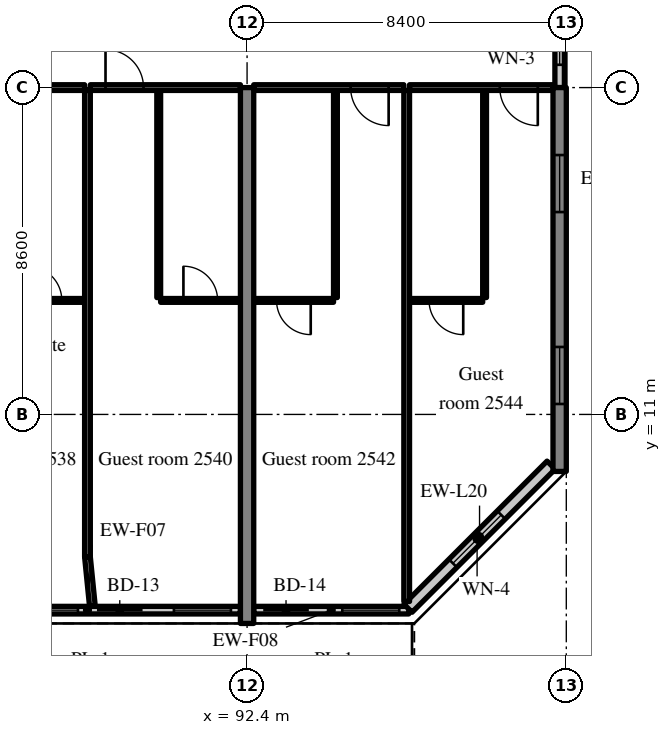
"""IFC4 building model, lengths in metres.
Left out: names, types, materials, properties, quantities, classifications, styles, units other than length and angle.
Written with IfcOpenShell. Run it as: python <this file> out.ifc"""

import sys

from ifc_helpers import new_model, si_unit, direction, frame, frame_2d, origin, place, context, subcontext, project, spatial, rectangle, extrude, source, transform, mapped, element, fill, save


model = new_model("IFC4")
c1 = context("Model", 3, precision=1e-05, world=origin(), true_north=direction((0.0, 1.0)))
c2 = subcontext(c1, "Body", "Model", "MODEL_VIEW")
j1 = project(units=[si_unit("LENGTHUNIT", "METRE"), si_unit("PLANEANGLEUNIT", "RADIAN")], contexts=[c1])
p1 = place(None, origin())
s1 = spatial("IfcSite", under=j1, at=p1, CompositionType="ELEMENT")
p2 = place(p1, origin())
s2 = spatial("IfcBuilding", under=s1, at=p2, CompositionType="ELEMENT")
p3 = place(p2, frame((0.0, 0.0, 106.6)))
s3 = spatial("IfcBuildingStorey", under=s2, at=p3, CompositionType="ELEMENT", Elevation=106.6)
m1 = source(origin(), c2, "Body", "SweptSolid", [
    extrude(rectangle(XDim=14.1, YDim=0.35, at=frame_2d((7.05, 0.0))), origin(), (0.0, 0.0, 1.0), 3.52),
])
p4 = place(p3, frame((92.4, 5.5, 0.0), z_axis=(0.0, 0.0, 1.0), x_axis=(0.0, 1.0, 0.0)))
e1 = element("IfcWall", 1, at=p4, inside=s3, PredefinedType="SHEAR", context=c2, shape_type="MappedRepresentation", body=[
    mapped(m1, transform((0.0, 0.0, 0.0), scale=1.0)),
])
m2 = source(origin(), c2, "Body", "SweptSolid", [
    extrude(rectangle(XDim=10.1, YDim=0.35, at=frame_2d((5.05, 0.0))), origin(), (0.0, 0.0, 1.0), 3.52),
])
p5 = place(p3, frame((100.625, 9.5, 0.0), z_axis=(0.0, 0.0, 1.0), x_axis=(0.0, 1.0, 0.0)))
e2 = element("IfcWall", 2, at=p5, inside=s3, PredefinedType="SHEAR", context=c2, shape_type="MappedRepresentation", body=[
    mapped(m2, transform((0.0, 0.0, 0.0), scale=1.0)),
])
m3 = source(origin(), c2, "Body", "SweptSolid", [
    extrude(rectangle(XDim=1.5, YDim=1.5, at=frame_2d((0.75, 0.75))), frame((0.0, 0.185, 0.0), z_axis=(0.0, -1.0, 0.0), x_axis=(1.0, 0.0, 0.0)), (0.0, 0.0, 1.0), 0.37),
])
p6 = place(p5, frame((1.775, 0.0, 0.9)))
e3 = element("IfcOpeningElement", 3, at=p6, cuts=e2, PredefinedType="OPENING", context=c2, shape_type="MappedRepresentation", body=[
    mapped(m3, transform((0.0, 0.0, 0.0), scale=1.0)),
])
p7 = place(p5, frame((6.825, 0.0, 0.9)))
e4 = element("IfcOpeningElement", 4, at=p7, cuts=e2, PredefinedType="OPENING", context=c2, shape_type="MappedRepresentation", body=[
    mapped(m3, transform((0.0, 0.0, 0.0), scale=1.0)),
])
m4 = source(origin(), c2, "Body", "SweptSolid", [
    extrude(rectangle(XDim=8.05, YDim=0.2, at=frame_2d((4.025, 0.0))), origin(), (0.0, 0.0, 1.0), 2.82),
])
p8 = place(p3, frame((84.175, 5.85, 0.0), z_axis=(0.0, 0.0, 1.0), x_axis=(1.0, 0.0, 0.0)))
e5 = element("IfcWall", 5, at=p8, inside=s3, PredefinedType="SOLIDWALL", context=c2, shape_type="MappedRepresentation", body=[
    mapped(m4, transform((0.0, 0.0, 0.0), scale=1.0)),
])
m5 = source(origin(), c2, "Body", "SweptSolid", [
    extrude(rectangle(XDim=1.2, YDim=2.4, at=frame_2d((0.6, 1.2))), frame((0.0, 0.11, 0.0), z_axis=(0.0, -1.0, 0.0), x_axis=(1.0, 0.0, 0.0)), (0.0, 0.0, 1.0), 0.22),
])
p9 = place(p8, frame((0.25, 0.0, 0.0)))
e6 = element("IfcOpeningElement", 6, at=p9, cuts=e5, PredefinedType="OPENING", context=c2, shape_type="MappedRepresentation", body=[
    mapped(m5, transform((0.0, 0.0, 0.0), scale=1.0)),
])
m6 = source(origin(), c2, "Body", "SweptSolid", [
    extrude(rectangle(XDim=1.5, YDim=1.5, at=frame_2d((0.75, 0.75))), frame((0.0, 0.11, 0.0), z_axis=(0.0, -1.0, 0.0), x_axis=(1.0, 0.0, 0.0)), (0.0, 0.0, 1.0), 0.22),
])
p10 = place(p8, frame((2.275, 0.0, 0.9)))
e7 = element("IfcOpeningElement", 7, at=p10, cuts=e5, PredefinedType="OPENING", context=c2, shape_type="MappedRepresentation", body=[
    mapped(m6, transform((0.0, 0.0, 0.0), scale=1.0)),
])
p11 = place(p8, frame((4.275, 0.0, 0.0)))
e8 = element("IfcOpeningElement", 8, at=p11, cuts=e5, PredefinedType="OPENING", context=c2, shape_type="MappedRepresentation", body=[
    mapped(m5, transform((0.0, 0.0, 0.0), scale=1.0)),
])
p12 = place(p8, frame((6.3, 0.0, 0.9)))
e9 = element("IfcOpeningElement", 9, at=p12, cuts=e5, PredefinedType="OPENING", context=c2, shape_type="MappedRepresentation", body=[
    mapped(m6, transform((0.0, 0.0, 0.0), scale=1.0)),
])
m7 = source(origin(), c2, "Body", "SweptSolid", [
    extrude(rectangle(XDim=4.08, YDim=0.2, at=frame_2d((2.04, 0.0))), origin(), (0.0, 0.0, 1.0), 2.82),
])
p13 = place(p3, frame((92.575, 5.85, 0.0), z_axis=(0.0, 0.0, 1.0), x_axis=(1.0, 0.0, 0.0)))
e10 = element("IfcWall", 10, at=p13, inside=s3, PredefinedType="SOLIDWALL", context=c2, shape_type="MappedRepresentation", body=[
    mapped(m7, transform((0.0, 0.0, 0.0), scale=1.0)),
])
p14 = place(p13, frame((0.25, 0.0, 0.0)))
e11 = element("IfcOpeningElement", 11, at=p14, cuts=e10, PredefinedType="OPENING", context=c2, shape_type="MappedRepresentation", body=[
    mapped(m5, transform((0.0, 0.0, 0.0), scale=1.0)),
])
p15 = place(p13, frame((2.33, 0.0, 0.9)))
e12 = element("IfcOpeningElement", 12, at=p15, cuts=e10, PredefinedType="OPENING", context=c2, shape_type="MappedRepresentation", body=[
    mapped(m6, transform((0.0, 0.0, 0.0), scale=1.0)),
])
m8 = source(origin(), c2, "Body", "SweptSolid", [
    extrude(rectangle(XDim=5.326, YDim=0.3, at=frame_2d((2.663, 0.0))), origin(), (0.0, 0.0, 1.0), 3.52),
])
p16 = place(p3, frame((96.634, 5.9, 0.0), z_axis=(0.0, 0.0, 1.0), x_axis=(0.707083859269, 0.707129702361, 0.0)))
e13 = element("IfcWall", 13, at=p16, inside=s3, PredefinedType="SOLIDWALL", context=c2, shape_type="MappedRepresentation", body=[
    mapped(m8, transform((0.0, 0.0, 0.0), scale=1.0)),
])
m9 = source(origin(), c2, "Body", "SweptSolid", [
    extrude(rectangle(XDim=1.8, YDim=1.5, at=frame_2d((0.9, 0.75))), frame((0.0, 0.16, 0.0), z_axis=(0.0, -1.0, 0.0), x_axis=(1.0, 0.0, 0.0)), (0.0, 0.0, 1.0), 0.32),
])
p17 = place(p16, frame((1.672, 0.0, 0.9)))
e14 = element("IfcOpeningElement", 14, at=p17, cuts=e13, PredefinedType="OPENING", context=c2, shape_type="MappedRepresentation", body=[
    mapped(m9, transform((0.0, 0.0, 0.0), scale=1.0)),
])
m10 = source(origin(), c2, "Body", "SweptSolid", [
    extrude(rectangle(XDim=2.4, YDim=0.25, at=frame_2d((1.2, 0.0))), origin(), (0.0, 0.0, 1.0), 2.62),
])
p18 = place(p3, frame((100.625, 19.6, 0.0), z_axis=(0.0, 0.0, 1.0), x_axis=(0.0, 1.0, 0.0)))
e15 = element("IfcWall", 15, at=p18, inside=s3, PredefinedType="SOLIDWALL", context=c2, shape_type="MappedRepresentation", body=[
    mapped(m10, transform((0.0, 0.0, 0.0), scale=1.0)),
])
m11 = source(origin(), c2, "Body", "SweptSolid", [
    extrude(rectangle(XDim=1.2, YDim=1.5, at=frame_2d((0.6, 0.75))), frame((0.0, 0.135, 0.0), z_axis=(0.0, -1.0, 0.0), x_axis=(1.0, 0.0, 0.0)), (0.0, 0.0, 1.0), 0.27),
])
p19 = place(p18, frame((0.6, 0.0, 0.9)))
e16 = element("IfcOpeningElement", 16, at=p19, cuts=e15, PredefinedType="OPENING", context=c2, shape_type="MappedRepresentation", body=[
    mapped(m11, transform((0.0, 0.0, 0.0), scale=1.0)),
])
m12 = source(origin(), c2, "Body", "SweptSolid", [
    extrude(rectangle(XDim=2.1, YDim=0.1, at=frame_2d((1.05, 0.0))), origin(), (0.0, 0.0, 1.0), 3.52),
])
p20 = place(p3, frame((86.025, 14.0, 0.0), z_axis=(0.0, 0.0, 1.0), x_axis=(1.0, 0.0, 0.0)))
e17 = element("IfcWall", 17, at=p20, inside=s3, PredefinedType="PARTITIONING", context=c2, shape_type="MappedRepresentation", body=[
    mapped(m12, transform((0.0, 0.0, 0.0), scale=1.0)),
])
m13 = source(origin(), c2, "Body", "SweptSolid", [
    extrude(rectangle(XDim=0.9, YDim=2.1, at=frame_2d((0.45, 1.05))), frame((0.0, 0.06, 0.0), z_axis=(0.0, -1.0, 0.0), x_axis=(1.0, 0.0, 0.0)), (0.0, 0.0, 1.0), 0.12),
])
p21 = place(p20, frame((0.6, 0.0, 0.0)))
e18 = element("IfcOpeningElement", 18, at=p21, cuts=e17, PredefinedType="OPENING", context=c2, shape_type="MappedRepresentation", body=[
    mapped(m13, transform((0.0, 0.0, 0.0), scale=1.0)),
])
m14 = source(origin(), c2, "Body", "SweptSolid", [
    extrude(rectangle(XDim=3.95, YDim=0.15, at=frame_2d((1.975, 0.0))), origin(), (0.0, 0.0, 1.0), 2.82),
])
p22 = place(p3, frame((84.175, 19.6, 0.0), z_axis=(0.0, 0.0, 1.0), x_axis=(1.0, 0.0, 0.0)))
e19 = element("IfcWall", 19, at=p22, inside=s3, PredefinedType="PARTITIONING", context=c2, shape_type="MappedRepresentation", body=[
    mapped(m14, transform((0.0, 0.0, 0.0), scale=1.0)),
])
m15 = source(origin(), c2, "Body", "SweptSolid", [
    extrude(rectangle(XDim=1.0, YDim=2.1, at=frame_2d((0.5, 1.05))), frame((0.0, 0.085, 0.0), z_axis=(0.0, -1.0, 0.0), x_axis=(1.0, 0.0, 0.0)), (0.0, 0.0, 1.0), 0.17),
])
p23 = place(p22, frame((0.4, 0.0, 0.0)))
e20 = element("IfcOpeningElement", 20, at=p23, cuts=e19, PredefinedType="OPENING", context=c2, shape_type="MappedRepresentation", body=[
    mapped(m15, transform((0.0, 0.0, 0.0), scale=1.0)),
])
m16 = source(origin(), c2, "Body", "SweptSolid", [
    extrude(rectangle(XDim=5.45, YDim=0.1, at=frame_2d((2.725, 0.0))), origin(), (0.0, 0.0, 1.0), 3.52),
])
p24 = place(p3, frame((90.075, 14.075, 0.0), z_axis=(0.0, 0.0, 1.0), x_axis=(0.0, 1.0, 0.0)))
e21 = element("IfcWall", 21, at=p24, inside=s3, PredefinedType="PARTITIONING", context=c2, shape_type="MappedRepresentation", body=[
    mapped(m16, transform((0.0, 0.0, 0.0), scale=1.0)),
])
p25 = place(p3, frame((90.125, 14.0, 0.0), z_axis=(0.0, 0.0, 1.0), x_axis=(1.0, 0.0, 0.0)))
e22 = element("IfcWall", 22, at=p25, inside=s3, PredefinedType="PARTITIONING", context=c2, shape_type="MappedRepresentation", body=[
    mapped(m12, transform((0.0, 0.0, 0.0), scale=1.0)),
])
p26 = place(p25, frame((0.6, 0.0, 0.0)))
e23 = element("IfcOpeningElement", 23, at=p26, cuts=e22, PredefinedType="OPENING", context=c2, shape_type="MappedRepresentation", body=[
    mapped(m13, transform((0.0, 0.0, 0.0), scale=1.0)),
])
m17 = source(origin(), c2, "Body", "SweptSolid", [
    extrude(rectangle(XDim=3.95, YDim=0.15, at=frame_2d((1.975, 0.0))), origin(), (0.0, 0.0, 1.0), 2.82),
])
p27 = place(p3, frame((88.275, 19.6, 0.0), z_axis=(0.0, 0.0, 1.0), x_axis=(1.0, 0.0, 0.0)))
e24 = element("IfcWall", 24, at=p27, inside=s3, PredefinedType="PARTITIONING", context=c2, shape_type="MappedRepresentation", body=[
    mapped(m17, transform((0.0, 0.0, 0.0), scale=1.0)),
])
p28 = place(p27, frame((0.4, 0.0, 0.0)))
e25 = element("IfcOpeningElement", 25, at=p28, cuts=e24, PredefinedType="OPENING", context=c2, shape_type="MappedRepresentation", body=[
    mapped(m15, transform((0.0, 0.0, 0.0), scale=1.0)),
])
m18 = source(origin(), c2, "Body", "SweptSolid", [
    extrude(rectangle(XDim=12.275, YDim=0.15, at=frame_2d((6.137, 0.0))), origin(), (0.0, 0.0, 1.0), 3.52),
])
p29 = place(p3, frame((88.2, 7.25, 0.0), z_axis=(0.0, 0.0, 1.0), x_axis=(0.0, 1.0, 0.0)))
e26 = element("IfcWall", 26, at=p29, inside=s3, PredefinedType="PARTITIONING", context=c2, shape_type="MappedRepresentation", body=[
    mapped(m18, transform((0.0, 0.0, 0.0), scale=1.0)),
])
p30 = place(p3, frame((94.725, 14.075, 0.0), z_axis=(0.0, 0.0, 1.0), x_axis=(0.0, 1.0, 0.0)))
e27 = element("IfcWall", 27, at=p30, inside=s3, PredefinedType="PARTITIONING", context=c2, shape_type="MappedRepresentation", body=[
    mapped(m16, transform((0.0, 0.0, 0.0), scale=1.0)),
])
p31 = place(p3, frame((92.575, 14.0, 0.0), z_axis=(0.0, 0.0, 1.0), x_axis=(1.0, 0.0, 0.0)))
e28 = element("IfcWall", 28, at=p31, inside=s3, PredefinedType="PARTITIONING", context=c2, shape_type="MappedRepresentation", body=[
    mapped(m12, transform((0.0, 0.0, 0.0), scale=1.0)),
])
p32 = place(p31, frame((0.6, 0.0, 0.0)))
e29 = element("IfcOpeningElement", 29, at=p32, cuts=e28, PredefinedType="OPENING", context=c2, shape_type="MappedRepresentation", body=[
    mapped(m13, transform((0.0, 0.0, 0.0), scale=1.0)),
])
p33 = place(p3, frame((92.575, 19.6, 0.0), z_axis=(0.0, 0.0, 1.0), x_axis=(1.0, 0.0, 0.0)))
e30 = element("IfcWall", 30, at=p33, inside=s3, PredefinedType="PARTITIONING", context=c2, shape_type="MappedRepresentation", body=[
    mapped(m14, transform((0.0, 0.0, 0.0), scale=1.0)),
])
p34 = place(p33, frame((2.55, 0.0, 0.0)))
e31 = element("IfcOpeningElement", 31, at=p34, cuts=e30, PredefinedType="OPENING", context=c2, shape_type="MappedRepresentation", body=[
    mapped(m15, transform((0.0, 0.0, 0.0), scale=1.0)),
])
p35 = place(p3, frame((98.65, 14.075, 0.0), z_axis=(0.0, 0.0, 1.0), x_axis=(0.0, 1.0, 0.0)))
e32 = element("IfcWall", 32, at=p35, inside=s3, PredefinedType="PARTITIONING", context=c2, shape_type="MappedRepresentation", body=[
    mapped(m16, transform((0.0, 0.0, 0.0), scale=1.0)),
])
m19 = source(origin(), c2, "Body", "SweptSolid", [
    extrude(rectangle(XDim=1.925, YDim=0.1, at=frame_2d((0.962, 0.0))), origin(), (0.0, 0.0, 1.0), 3.52),
])
p36 = place(p3, frame((96.675, 14.0, 0.0), z_axis=(0.0, 0.0, 1.0), x_axis=(1.0, 0.0, 0.0)))
e33 = element("IfcWall", 33, at=p36, inside=s3, PredefinedType="PARTITIONING", context=c2, shape_type="MappedRepresentation", body=[
    mapped(m19, transform((0.0, 0.0, 0.0), scale=1.0)),
])
p37 = place(p36, frame((0.513, 0.0, 0.0)))
e34 = element("IfcOpeningElement", 34, at=p37, cuts=e33, PredefinedType="OPENING", context=c2, shape_type="MappedRepresentation", body=[
    mapped(m13, transform((0.0, 0.0, 0.0), scale=1.0)),
])
m20 = source(origin(), c2, "Body", "SweptSolid", [
    extrude(rectangle(XDim=3.775, YDim=0.15, at=frame_2d((1.887, 0.0))), origin(), (0.0, 0.0, 1.0), 2.82),
])
p38 = place(p3, frame((96.675, 19.6, 0.0), z_axis=(0.0, 0.0, 1.0), x_axis=(1.0, 0.0, 0.0)))
e35 = element("IfcWall", 35, at=p38, inside=s3, PredefinedType="PARTITIONING", context=c2, shape_type="MappedRepresentation", body=[
    mapped(m20, transform((0.0, 0.0, 0.0), scale=1.0)),
])
p39 = place(p38, frame((2.375, 0.0, 0.0)))
e36 = element("IfcOpeningElement", 36, at=p39, cuts=e35, PredefinedType="OPENING", context=c2, shape_type="MappedRepresentation", body=[
    mapped(m15, transform((0.0, 0.0, 0.0), scale=1.0)),
])
m21 = source(origin(), c2, "Body", "SweptSolid", [
    extrude(rectangle(XDim=13.447, YDim=0.15, at=frame_2d((6.724, 0.0))), origin(), (0.0, 0.0, 1.0), 3.52),
])
p40 = place(p3, frame((96.6, 6.078, 0.0), z_axis=(0.0, 0.0, 1.0), x_axis=(0.0, 1.0, 0.0)))
e37 = element("IfcWall", 37, at=p40, inside=s3, PredefinedType="PARTITIONING", context=c2, shape_type="MappedRepresentation", body=[
    mapped(m21, transform((0.0, 0.0, 0.0), scale=1.0)),
])
m22 = source(origin(), c2, "Body", "SweptSolid", [
    extrude(rectangle(XDim=1.307, YDim=0.15, at=frame_2d((0.653, 0.0))), origin(), (0.0, 0.0, 1.0), 3.52),
])
p41 = place(p3, frame((88.33, 5.95, 0.0), z_axis=(0.0, 0.0, 1.0), x_axis=(-0.099596223396, 0.99502793543, 0.0)))
e38 = element("IfcWall", 38, at=p41, inside=s3, PredefinedType="PARTITIONING", context=c2, shape_type="MappedRepresentation", body=[
    mapped(m22, transform((0.0, 0.0, 0.0), scale=1.0)),
])
m23 = source(origin(), c2, "Body", "SweptSolid", [
    extrude(rectangle(XDim=1.5, YDim=1.5, at=frame_2d((0.75, 0.75))), frame((0.0, 0.03, 0.0), z_axis=(0.0, -1.0, 0.0), x_axis=(1.0, 0.0, 0.0)), (0.0, 0.0, 1.0), 0.06),
])
p42 = place(p10, origin())
e39 = element("IfcWindow", 39, at=p42, inside=s3, PartitioningType="SINGLE_PANEL", PredefinedType="WINDOW", context=c2, shape_type="MappedRepresentation", body=[
    mapped(m23, transform((0.0, 0.0, 0.0), scale=1.0)),
])
fill(e7, e39)
m24 = source(origin(), c2, "Body", "SweptSolid", [
    extrude(rectangle(XDim=1.2, YDim=2.4, at=frame_2d((0.6, 1.2))), frame((0.0, 0.025, 0.0), z_axis=(0.0, -1.0, 0.0), x_axis=(1.0, 0.0, 0.0)), (0.0, 0.0, 1.0), 0.05),
])
p43 = place(p11, origin())
e40 = element("IfcDoor", 40, at=p43, inside=s3, OperationType="SLIDING_TO_LEFT", PredefinedType="DOOR", context=c2, shape_type="MappedRepresentation", body=[
    mapped(m24, transform((0.0, 0.0, 0.0), scale=1.0)),
])
fill(e8, e40)
p44 = place(p12, origin())
e41 = element("IfcWindow", 41, at=p44, inside=s3, PartitioningType="SINGLE_PANEL", PredefinedType="WINDOW", context=c2, shape_type="MappedRepresentation", body=[
    mapped(m23, transform((0.0, 0.0, 0.0), scale=1.0)),
])
fill(e9, e41)
p45 = place(p14, origin())
e42 = element("IfcDoor", 42, at=p45, inside=s3, OperationType="SLIDING_TO_RIGHT", PredefinedType="DOOR", context=c2, shape_type="MappedRepresentation", body=[
    mapped(m24, transform((0.0, 0.0, 0.0), scale=1.0)),
])
fill(e11, e42)
p46 = place(p15, origin())
e43 = element("IfcWindow", 43, at=p46, inside=s3, PartitioningType="SINGLE_PANEL", PredefinedType="WINDOW", context=c2, shape_type="MappedRepresentation", body=[
    mapped(m23, transform((0.0, 0.0, 0.0), scale=1.0)),
])
fill(e12, e43)
m25 = source(origin(), c2, "Body", "SweptSolid", [
    extrude(rectangle(XDim=1.8, YDim=1.5, at=frame_2d((0.9, 0.75))), frame((0.0, 0.03, 0.0), z_axis=(0.0, -1.0, 0.0), x_axis=(1.0, 0.0, 0.0)), (0.0, 0.0, 1.0), 0.06),
])
p47 = place(p17, origin())
e44 = element("IfcWindow", 44, at=p47, inside=s3, PartitioningType="SINGLE_PANEL", PredefinedType="WINDOW", context=c2, shape_type="MappedRepresentation", body=[
    mapped(m25, transform((0.0, 0.0, 0.0), scale=1.0)),
])
fill(e14, e44)
p48 = place(p6, origin())
e45 = element("IfcWindow", 45, at=p48, inside=s3, PartitioningType="SINGLE_PANEL", PredefinedType="WINDOW", context=c2, shape_type="MappedRepresentation", body=[
    mapped(m23, transform((0.0, 0.0, 0.0), scale=1.0)),
])
fill(e3, e45)
p49 = place(p7, origin())
e46 = element("IfcWindow", 46, at=p49, inside=s3, PartitioningType="SINGLE_PANEL", PredefinedType="WINDOW", context=c2, shape_type="MappedRepresentation", body=[
    mapped(m23, transform((0.0, 0.0, 0.0), scale=1.0)),
])
fill(e4, e46)
m26 = source(origin(), c2, "Body", "SweptSolid", [
    extrude(rectangle(XDim=1.2, YDim=1.5, at=frame_2d((0.6, 0.75))), frame((0.0, 0.03, 0.0), z_axis=(0.0, -1.0, 0.0), x_axis=(1.0, 0.0, 0.0)), (0.0, 0.0, 1.0), 0.06),
])
p50 = place(p19, origin())
e47 = element("IfcWindow", 47, at=p50, inside=s3, PartitioningType="SINGLE_PANEL", PredefinedType="WINDOW", context=c2, shape_type="MappedRepresentation", body=[
    mapped(m26, transform((0.0, 0.0, 0.0), scale=1.0)),
])
fill(e16, e47)
m27 = source(origin(), c2, "Body", "SweptSolid", [
    extrude(rectangle(XDim=0.9, YDim=2.1, at=frame_2d((0.45, 1.05))), frame((0.0, 0.025, 0.0), z_axis=(0.0, -1.0, 0.0), x_axis=(1.0, 0.0, 0.0)), (0.0, 0.0, 1.0), 0.05),
])
p51 = place(p21, origin())
e48 = element("IfcDoor", 48, at=p51, inside=s3, OperationType="SINGLE_SWING_LEFT", PredefinedType="DOOR", context=c2, shape_type="MappedRepresentation", body=[
    mapped(m27, transform((0.0, 0.0, 0.0), scale=1.0)),
])
fill(e18, e48)
p52 = place(p26, origin())
e49 = element("IfcDoor", 49, at=p52, inside=s3, OperationType="SINGLE_SWING_LEFT", PredefinedType="DOOR", context=c2, shape_type="MappedRepresentation", body=[
    mapped(m27, transform((0.0, 0.0, 0.0), scale=1.0)),
])
fill(e23, e49)
m28 = source(origin(), c2, "Body", "SweptSolid", [
    extrude(rectangle(XDim=1.0, YDim=2.1, at=frame_2d((0.5, 1.05))), frame((0.0, 0.025, 0.0), z_axis=(0.0, -1.0, 0.0), x_axis=(1.0, 0.0, 0.0)), (0.0, 0.0, 1.0), 0.05),
])
p53 = place(p28, origin())
e50 = element("IfcDoor", 50, at=p53, inside=s3, OperationType="SINGLE_SWING_LEFT", PredefinedType="DOOR", context=c2, shape_type="MappedRepresentation", body=[
    mapped(m28, transform((0.0, 0.0, 0.0), scale=1.0)),
])
fill(e25, e50)
p54 = place(p32, origin())
e51 = element("IfcDoor", 51, at=p54, inside=s3, OperationType="SINGLE_SWING_RIGHT", PredefinedType="DOOR", context=c2, shape_type="MappedRepresentation", body=[
    mapped(m27, transform((0.0, 0.0, 0.0), scale=1.0)),
])
fill(e29, e51)
p55 = place(p34, origin())
e52 = element("IfcDoor", 52, at=p55, inside=s3, OperationType="SINGLE_SWING_RIGHT", PredefinedType="DOOR", context=c2, shape_type="MappedRepresentation", body=[
    mapped(m28, transform((0.0, 0.0, 0.0), scale=1.0)),
])
fill(e31, e52)
p56 = place(p37, origin())
e53 = element("IfcDoor", 53, at=p56, inside=s3, OperationType="SINGLE_SWING_RIGHT", PredefinedType="DOOR", context=c2, shape_type="MappedRepresentation", body=[
    mapped(m27, transform((0.0, 0.0, 0.0), scale=1.0)),
])
fill(e34, e53)
p57 = place(p39, origin())
e54 = element("IfcDoor", 54, at=p57, inside=s3, OperationType="SINGLE_SWING_RIGHT", PredefinedType="DOOR", context=c2, shape_type="MappedRepresentation", body=[
    mapped(m28, transform((0.0, 0.0, 0.0), scale=1.0)),
])
fill(e36, e54)
save(model, sys.argv[1])
